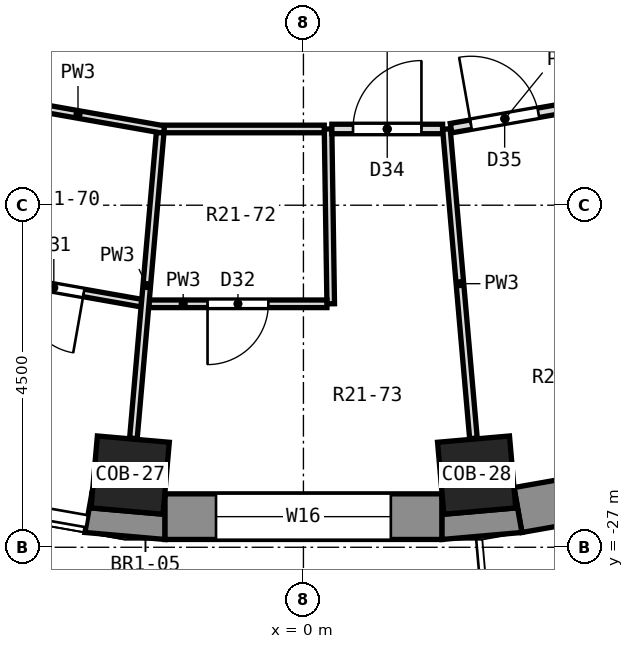
"""IFC4 building model, lengths in metres.
Left out: names, types, materials, properties, quantities, classifications, styles, units other than length and angle.
Written with IfcOpenShell. Run it as: python <this file> out.ifc"""

import sys

from ifc_helpers import new_model, si_unit, direction, frame, frame_2d, origin, origin_2d, place, context, subcontext, project, spatial, polyline, rectangle, outline, extrude, element, fill, save


model = new_model("IFC4")
c1 = context("Model", 3, precision=1e-05, world=origin(), true_north=direction((0.0, 1.0)))
c2 = subcontext(c1, "Body", "Model", "MODEL_VIEW")
j1 = project(units=[si_unit("LENGTHUNIT", "METRE"), si_unit("PLANEANGLEUNIT", "RADIAN")], contexts=[c1])
p1 = place(None, origin())
s1 = spatial("IfcSite", under=j1, at=p1, CompositionType="ELEMENT")
p2 = place(p1, origin())
s2 = spatial("IfcBuilding", under=s1, at=p2, CompositionType="ELEMENT")
p3 = place(p2, frame((0.0, 0.0, 131.5)))
s3 = spatial("IfcBuildingStorey", under=s2, at=p3, CompositionType="ELEMENT", Elevation=131.5)
for number, where, z_axis, x_axis in (
    (1, (-2.279, -26.051, 0.0), (0.0, 0.0, 1.0), (-0.087, -0.996, 0.0)),
    (2, (2.279, -26.051, 0.0), (0.0, 0.0, 1.0), (0.087, -0.996, 0.0)),
):
    element("IfcColumn", number, at=place(p3, frame(where, z_axis=z_axis, x_axis=x_axis)), inside=s3, PredefinedType="COLUMN", context=c2, shape_type="SweptSolid", body=[
        extrude(rectangle(XDim=0.95, YDim=0.95, at=origin_2d()), origin(), (0.0, 0.0, 1.0), 3.3),
    ])
p4 = place(p3, frame((-1.824, -26.597, 0.0), z_axis=(0.0, 0.0, 1.0), x_axis=(1.0, 0.0, 0.0)))
e3 = element("IfcWall", 3, at=p4, inside=s3, PredefinedType="SOLIDWALL", context=c2, shape_type="SweptSolid", body=[
    extrude(rectangle(XDim=3.648, YDim=0.6, at=frame_2d((1.824, 0.0))), origin(), (0.0, 0.0, 1.0), 2.8),
])
p5 = place(p4, frame((0.674, 0.0, 0.9)))
e4 = element("IfcOpeningElement", 4, at=p5, cuts=e3, PredefinedType="OPENING", context=c2, shape_type="SweptSolid", body=[
    extrude(rectangle(XDim=2.3, YDim=1.8, at=frame_2d((1.15, 0.9))), frame((0.0, 0.312, 0.0), z_axis=(0.0, -1.0, 0.0), x_axis=(1.0, 0.0, 0.0)), (0.0, 0.0, 1.0), 0.624),
])
p6 = place(p3, frame((2.822, -26.51, 0.0), z_axis=(0.0, 0.0, 1.0), x_axis=(0.984803764455, 0.173670796382, 0.0)))
e5 = element("IfcWall", 5, at=p6, inside=s3, PredefinedType="SOLIDWALL", context=c2, shape_type="SweptSolid", body=[
    extrude(rectangle(XDim=3.648, YDim=0.6, at=frame_2d((1.824, 0.0))), origin(), (0.0, 0.0, 1.0), 2.8),
])
p7 = place(p6, frame((0.674, 0.0, 0.9)))
e6 = element("IfcOpeningElement", 6, at=p7, cuts=e5, PredefinedType="OPENING", context=c2, shape_type="SweptSolid", body=[
    extrude(rectangle(XDim=2.3, YDim=1.8, at=frame_2d((1.15, 0.9))), frame((0.0, 0.312, 0.0), z_axis=(0.0, -1.0, 0.0), x_axis=(1.0, 0.0, 0.0)), (0.0, 0.0, 1.0), 0.624),
])
p8 = place(p3, origin())
e7 = element("IfcWall", 7, at=p8, inside=s3, PredefinedType="SOLIDWALL", context=c2, shape_type="SweptSolid", body=[
    extrude(outline(polyline([(-2.875, -26.805), (-1.824, -26.897), (-1.824, -26.297), (-1.847, -26.565), (-2.794, -26.482), (-2.77, -26.215), (-2.875, -26.805)])), origin(), (0.0, 0.0, 1.0), 2.8),
])
p9 = place(p3, origin())
e8 = element("IfcWall", 8, at=p9, inside=s3, PredefinedType="SOLIDWALL", context=c2, shape_type="SweptSolid", body=[
    extrude(outline(polyline([(2.875, -26.805), (2.77, -26.215), (2.794, -26.482), (1.847, -26.565), (1.824, -26.297), (1.824, -26.897), (2.875, -26.805)])), origin(), (0.0, 0.0, 1.0), 2.8),
])
p10 = place(p3, frame((0.324, -21.497, 0.0), z_axis=(0.0, 0.0, 1.0), x_axis=(0.015177107463, -0.999884821071, 0.0)))
e9 = element("IfcWall", 9, at=p10, inside=s3, PredefinedType="PARTITIONING", context=c2, shape_type="SweptSolid", body=[
    extrude(rectangle(XDim=2.3, YDim=0.1, at=frame_2d((1.15, 0.0))), origin(), (0.0, 0.0, 1.0), 2.8),
])
p11 = place(p3, frame((1.881, -21.497, 0.0), z_axis=(0.0, 0.0, 1.0), x_axis=(0.087060211484, -0.996203051379, 0.0)))
e10 = element("IfcWall", 10, at=p11, inside=s3, PredefinedType="PARTITIONING", context=c2, shape_type="SweptSolid", body=[
    extrude(rectangle(XDim=4.086, YDim=0.1, at=frame_2d((2.043, 0.0))), origin(), (0.0, 0.0, 1.0), 2.8),
])
p12 = place(p3, frame((-4.486, -23.373, 0.0), z_axis=(0.0, 0.0, 1.0), x_axis=(0.984802055472, -0.173680486922, 0.0)))
e11 = element("IfcWall", 11, at=p12, inside=s3, PredefinedType="PARTITIONING", context=c2, shape_type="SweptSolid", body=[
    extrude(rectangle(XDim=2.391, YDim=0.1, at=frame_2d((1.196, 0.0))), origin(), (0.0, 0.0, 1.0), 2.8),
])
p13 = place(p12, frame((0.821, 0.0, 0.0)))
e12 = element("IfcOpeningElement", 12, at=p13, cuts=e11, PredefinedType="OPENING", context=c2, shape_type="SweptSolid", body=[
    extrude(rectangle(XDim=0.8, YDim=2.1, at=frame_2d((0.4, 1.05))), frame((0.0, 0.062, 0.0), z_axis=(0.0, -1.0, 0.0), x_axis=(1.0, 0.0, 0.0)), (0.0, 0.0, 1.0), 0.124),
])
p14 = place(p3, frame((-4.101, -21.105, 0.0), z_axis=(0.0, 0.0, 1.0), x_axis=(0.984783558818, -0.173785333909, 0.0)))
e13 = element("IfcWall", 13, at=p14, inside=s3, PredefinedType="PARTITIONING", context=c2, shape_type="SweptSolid", body=[
    extrude(rectangle(XDim=2.305, YDim=0.1, at=frame_2d((1.153, 0.0))), origin(), (0.0, 0.0, 1.0), 2.8),
])
p15 = place(p3, frame((-2.032, -23.797, 0.0), z_axis=(0.0, 0.0, 1.0), x_axis=(1.0, 0.0, 0.0)))
e14 = element("IfcWall", 14, at=p15, inside=s3, PredefinedType="PARTITIONING", context=c2, shape_type="SweptSolid", body=[
    extrude(rectangle(XDim=2.341, YDim=0.1, at=frame_2d((1.17, 0.0))), origin(), (0.0, 0.0, 1.0), 2.8),
])
p16 = place(p15, frame((0.771, 0.0, 0.0)))
e15 = element("IfcOpeningElement", 15, at=p16, cuts=e14, PredefinedType="OPENING", context=c2, shape_type="SweptSolid", body=[
    extrude(rectangle(XDim=0.8, YDim=2.1, at=frame_2d((0.4, 1.05))), frame((0.0, 0.062, 0.0), z_axis=(0.0, -1.0, 0.0), x_axis=(1.0, 0.0, 0.0)), (0.0, 0.0, 1.0), 0.124),
])
p17 = place(p3, frame((-1.831, -21.497, 0.0), z_axis=(0.0, 0.0, 1.0), x_axis=(1.0, 0.0, 0.0)))
e16 = element("IfcWall", 16, at=p17, inside=s3, PredefinedType="PARTITIONING", context=c2, shape_type="SweptSolid", body=[
    extrude(rectangle(XDim=2.105, YDim=0.1, at=frame_2d((1.052, 0.0))), origin(), (0.0, 0.0, 1.0), 2.8),
])
p18 = place(p3, frame((0.374, -21.497, 0.0), z_axis=(0.0, 0.0, 1.0), x_axis=(1.0, 0.0, 0.0)))
e17 = element("IfcWall", 17, at=p18, inside=s3, PredefinedType="PARTITIONING", context=c2, shape_type="SweptSolid", body=[
    extrude(rectangle(XDim=1.457, YDim=0.125, at=frame_2d((0.729, 0.0))), origin(), (0.0, 0.0, 1.0), 2.8),
])
p19 = place(p18, frame((0.279, 0.0, 0.0)))
e18 = element("IfcOpeningElement", 18, at=p19, cuts=e17, PredefinedType="OPENING", context=c2, shape_type="SweptSolid", body=[
    extrude(rectangle(XDim=0.9, YDim=2.1, at=frame_2d((0.45, 1.05))), frame((0.0, 0.074, 0.0), z_axis=(0.0, -1.0, 0.0), x_axis=(1.0, 0.0, 0.0)), (0.0, 0.0, 1.0), 0.149),
])
p20 = place(p3, frame((1.943, -21.486, 0.0), z_axis=(0.0, 0.0, 1.0), x_axis=(0.984839675328, 0.173467039809, 0.0)))
e19 = element("IfcWall", 19, at=p20, inside=s3, PredefinedType="PARTITIONING", context=c2, shape_type="SweptSolid", body=[
    extrude(rectangle(XDim=1.444, YDim=0.125, at=frame_2d((0.722, 0.0))), origin(), (0.0, 0.0, 1.0), 2.8),
])
p21 = place(p20, frame((0.266, 0.0, 0.0)))
e20 = element("IfcOpeningElement", 20, at=p21, cuts=e19, PredefinedType="OPENING", context=c2, shape_type="SweptSolid", body=[
    extrude(rectangle(XDim=0.9, YDim=2.1, at=frame_2d((0.45, 1.05))), frame((0.0, 0.074, 0.0), z_axis=(0.0, -1.0, 0.0), x_axis=(1.0, 0.0, 0.0)), (0.0, 0.0, 1.0), 0.149),
])
p22 = place(p3, frame((-2.237, -25.567, 0.0), z_axis=(0.0, 0.0, 1.0), x_axis=(0.087169951933, 0.996193454847, 0.0)))
e21 = element("IfcWall", 21, at=p22, inside=s3, PredefinedType="PARTITIONING", context=c2, shape_type="SweptSolid", body=[
    extrude(rectangle(XDim=4.036, YDim=0.1, at=frame_2d((2.018, 0.0))), origin(), (0.0, 0.0, 1.0), 2.8),
])
p23 = place(p5, origin())
e22 = element("IfcWindow", 22, at=p23, inside=s3, PartitioningType="SINGLE_PANEL", PredefinedType="WINDOW", context=c2, shape_type="SweptSolid", body=[
    extrude(rectangle(XDim=2.3, YDim=1.8, at=frame_2d((1.15, 0.9))), frame((0.0, 0.18, 0.0), z_axis=(0.0, -1.0, 0.0), x_axis=(1.0, 0.0, 0.0)), (0.0, 0.0, 1.0), 0.06),
])
fill(e4, e22)
p24 = place(p13, frame((0.8, 0.0, 0.0), z_axis=(0.0, 0.0, 1.0), x_axis=(-1.0, 0.0, 0.0)))
e23 = element("IfcDoor", 23, at=p24, inside=s3, OperationType="SINGLE_SWING_LEFT", PredefinedType="DOOR", context=c2, shape_type="SweptSolid", body=[
    extrude(rectangle(XDim=0.8, YDim=2.1, at=frame_2d((0.4, 1.05))), frame((0.0, 0.025, 0.0), z_axis=(0.0, -1.0, 0.0), x_axis=(1.0, 0.0, 0.0)), (0.0, 0.0, 1.0), 0.05),
])
fill(e12, e23)
p25 = place(p16, frame((0.8, 0.0, 0.0), z_axis=(0.0, 0.0, 1.0), x_axis=(-1.0, 0.0, 0.0)))
e24 = element("IfcDoor", 24, at=p25, inside=s3, OperationType="SINGLE_SWING_RIGHT", PredefinedType="DOOR", context=c2, shape_type="SweptSolid", body=[
    extrude(rectangle(XDim=0.8, YDim=2.1, at=frame_2d((0.4, 1.05))), frame((0.0, 0.025, 0.0), z_axis=(0.0, -1.0, 0.0), x_axis=(1.0, 0.0, 0.0)), (0.0, 0.0, 1.0), 0.05),
])
fill(e15, e24)
p26 = place(p19, origin())
e25 = element("IfcDoor", 25, at=p26, inside=s3, OperationType="SINGLE_SWING_RIGHT", PredefinedType="DOOR", context=c2, shape_type="SweptSolid", body=[
    extrude(rectangle(XDim=0.9, YDim=2.1, at=frame_2d((0.45, 1.05))), frame((0.0, 0.025, 0.0), z_axis=(0.0, -1.0, 0.0), x_axis=(1.0, 0.0, 0.0)), (0.0, 0.0, 1.0), 0.05),
])
fill(e18, e25)
p27 = place(p21, origin())
e26 = element("IfcDoor", 26, at=p27, inside=s3, OperationType="SINGLE_SWING_LEFT", PredefinedType="DOOR", context=c2, shape_type="SweptSolid", body=[
    extrude(rectangle(XDim=0.9, YDim=2.1, at=frame_2d((0.45, 1.05))), frame((0.0, 0.025, 0.0), z_axis=(0.0, -1.0, 0.0), x_axis=(1.0, 0.0, 0.0)), (0.0, 0.0, 1.0), 0.05),
])
fill(e20, e26)
save(model, sys.argv[1])
